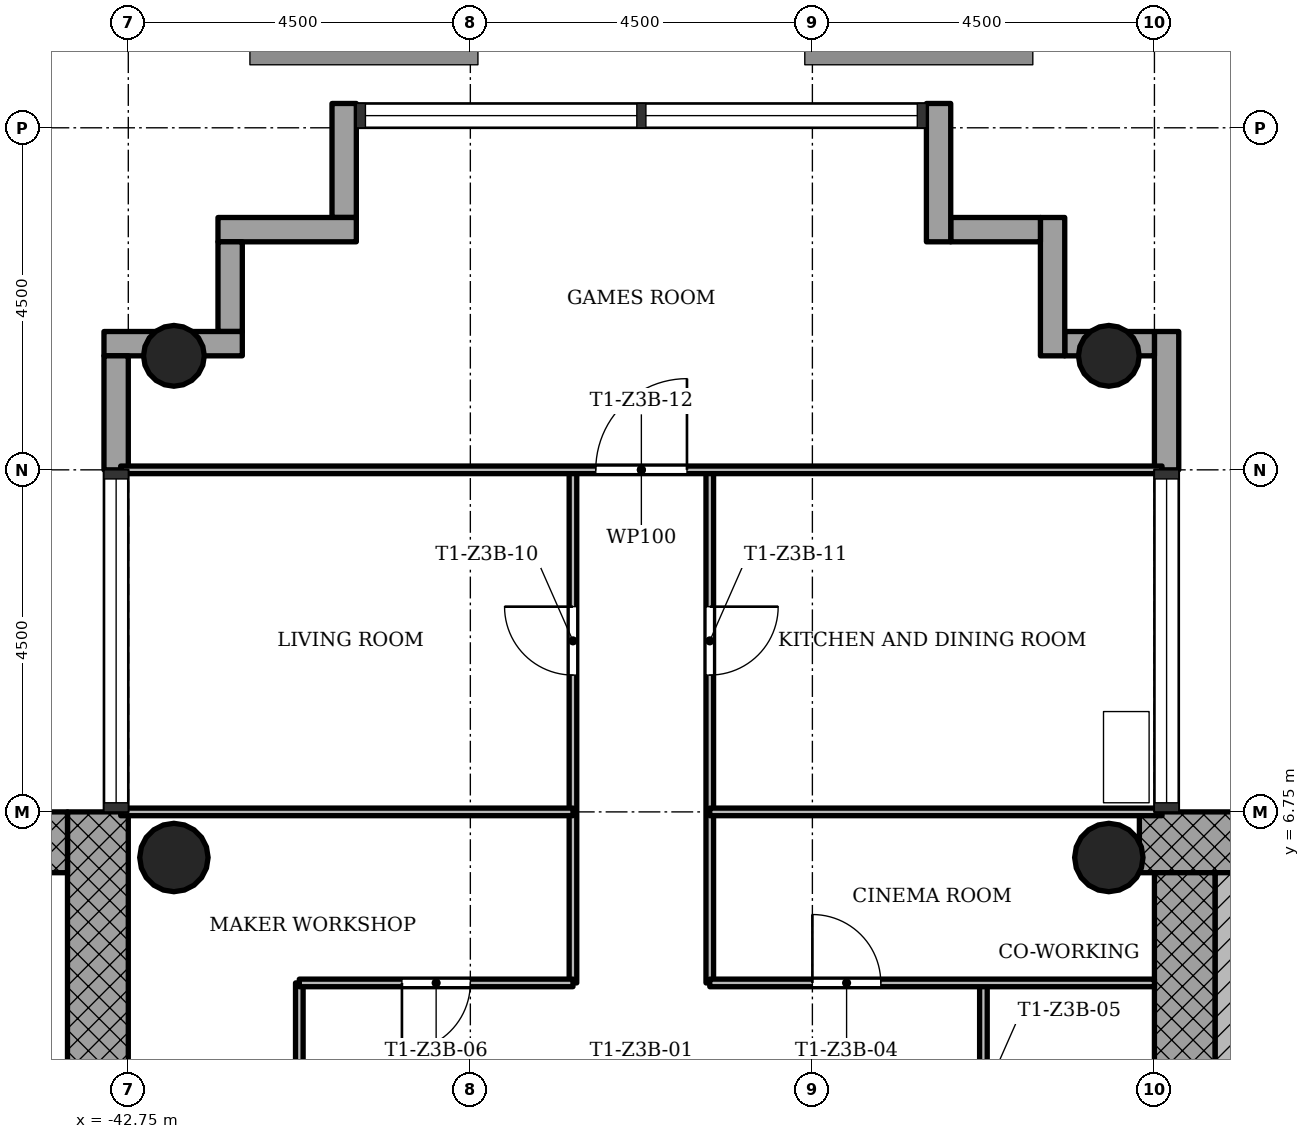
"""IFC4 building model, lengths in metres.
Left out: names, types, materials, properties, quantities, classifications, styles, units other than length and angle.
Written with IfcOpenShell. Run it as: python <this file> out.ifc"""

import sys

from ifc_helpers import new_model, si_unit, direction, frame, frame_2d, origin, origin_2d, place, context, subcontext, project, spatial, rectangle, hollow_circle, extrude, element, fill, save


model = new_model("IFC4")
c1 = context("Model", 3, precision=1e-05, world=origin(), true_north=direction((0.0, 1.0)))
c2 = subcontext(c1, "Body", "Model", "MODEL_VIEW")
j1 = project(units=[si_unit("LENGTHUNIT", "METRE"), si_unit("PLANEANGLEUNIT", "RADIAN")], contexts=[c1])
p1 = place(None, origin())
s1 = spatial("IfcSite", under=j1, at=p1, CompositionType="ELEMENT")
p2 = place(p1, origin())
s2 = spatial("IfcBuilding", under=s1, at=p2, CompositionType="ELEMENT")
p3 = place(p2, frame((0.0, 0.0, 143.9)))
s3 = spatial("IfcBuildingStorey", under=s2, at=p3, CompositionType="ELEMENT", Elevation=143.9)
p4 = place(p3, frame((-20.652, 6.35, 0.0), z_axis=(0.0, 0.0, 1.0), x_axis=(-1.0, 0.0, 0.0)))
e1 = element("IfcWall", 1, at=p4, inside=s3, PredefinedType="SHEAR", context=c2, shape_type="SweptSolid", body=[
    extrude(rectangle(XDim=8.796, YDim=0.8, at=frame_2d((4.398, 0.0))), origin(), (0.0, 0.0, 1.0), 3.4),
])
p5 = place(p3, frame((-28.85, 5.95, 0.0), z_axis=(0.0, 0.0, 1.0), x_axis=(0.0, -1.0, 0.0)))
e2 = element("IfcWall", 2, at=p5, inside=s3, PredefinedType="SHEAR", context=c2, shape_type="SweptSolid", body=[
    extrude(rectangle(XDim=12.7, YDim=0.8, at=frame_2d((6.35, 0.0))), origin(), (0.0, 0.0, 1.0), 3.4),
])
p6 = place(p5, frame((5.05, 0.0, 0.0)))
e3 = element("IfcOpeningElement", 3, at=p6, cuts=e2, PredefinedType="OPENING", context=c2, shape_type="SweptSolid", body=[
    extrude(rectangle(XDim=1.8, YDim=2.1, at=frame_2d((0.9, 1.05))), frame((0.0, 0.41, 0.0), z_axis=(0.0, -1.0, 0.0), x_axis=(1.0, 0.0, 0.0)), (0.0, 0.0, 1.0), 0.82),
])
p7 = place(p3, frame((-43.15, -5.95, 0.0), z_axis=(0.0, 0.0, 1.0), x_axis=(0.0, 1.0, 0.0)))
e4 = element("IfcWall", 4, at=p7, inside=s3, PredefinedType="SHEAR", context=c2, shape_type="SweptSolid", body=[
    extrude(rectangle(XDim=12.7, YDim=0.8, at=frame_2d((6.35, 0.0))), origin(), (0.0, 0.0, 1.0), 3.4),
])
p8 = place(p7, frame((5.05, 0.0, 0.0)))
e5 = element("IfcOpeningElement", 5, at=p8, cuts=e4, PredefinedType="OPENING", context=c2, shape_type="SweptSolid", body=[
    extrude(rectangle(XDim=1.8, YDim=2.1, at=frame_2d((0.9, 1.05))), frame((0.0, 0.41, 0.0), z_axis=(0.0, -1.0, 0.0), x_axis=(1.0, 0.0, 0.0)), (0.0, 0.0, 1.0), 0.82),
])
p9 = place(p3, frame((-43.55, 6.35, 0.0), z_axis=(0.0, 0.0, 1.0), x_axis=(-1.0, 0.0, 0.0)))
e6 = element("IfcWall", 6, at=p9, inside=s3, PredefinedType="SHEAR", context=c2, shape_type="SweptSolid", body=[
    extrude(rectangle(XDim=8.2, YDim=0.8, at=frame_2d((4.1, 0.0))), origin(), (0.0, 0.0, 1.0), 3.4),
])
for number, where, z_axis, x_axis in (
    (7, (-29.85, 12.75, 0.0), (0.0, 0.0, 1.0), (1.0, 0.0, 0.0)),
    (8, (-42.15, 12.75, 0.0), (0.0, 0.0, 1.0), (1.0, 0.0, 0.0)),
):
    element("IfcColumn", number, at=place(p3, frame(where, z_axis=z_axis, x_axis=x_axis)), inside=s3, PredefinedType="COLUMN", context=c2, shape_type="SweptSolid", body=[
        extrude(hollow_circle(Radius=0.4, WallThickness=0.028, at=origin_2d()), origin(), (0.0, 0.0, 1.0), 3.4),
    ])
for number, where, z_axis, x_axis in (
    (9, (-29.85, 6.15, 0.0), (0.0, 0.0, 1.0), (1.0, 0.0, 0.0)),
    (10, (-42.15, 6.15, 0.0), (0.0, 0.0, 1.0), (1.0, 0.0, 0.0)),
):
    element("IfcColumn", number, at=place(p3, frame(where, z_axis=z_axis, x_axis=x_axis)), inside=s3, PredefinedType="COLUMN", context=c2, shape_type="SweptSolid", body=[
        extrude(hollow_circle(Radius=0.45, WallThickness=0.032, at=origin_2d()), origin(), (0.0, 0.0, 1.0), 3.4),
    ])
p10 = place(p3, frame((-29.09, 11.25, -0.3), z_axis=(0.0, 0.0, 1.0), x_axis=(0.0, 1.0, 0.0)))
e11 = element("IfcWall", 11, at=p10, inside=s3, PredefinedType="STANDARD", context=c2, shape_type="SweptSolid", body=[
    extrude(rectangle(XDim=1.82, YDim=0.32, at=frame_2d((0.91, 0.0))), origin(), (0.0, 0.0, 1.0), 3.4),
])
p11 = place(p3, frame((-29.25, 12.91, -0.3), z_axis=(0.0, 0.0, 1.0), x_axis=(-1.0, 0.0, 0.0)))
e12 = element("IfcWall", 12, at=p11, inside=s3, PredefinedType="STANDARD", context=c2, shape_type="SweptSolid", body=[
    extrude(rectangle(XDim=1.18, YDim=0.32, at=frame_2d((0.59, 0.0))), origin(), (0.0, 0.0, 1.0), 3.4),
])
p12 = place(p3, frame((-30.59, 12.75, -0.3), z_axis=(0.0, 0.0, 1.0), x_axis=(0.0, 1.0, 0.0)))
e13 = element("IfcWall", 13, at=p12, inside=s3, PredefinedType="STANDARD", context=c2, shape_type="SweptSolid", body=[
    extrude(rectangle(XDim=1.82, YDim=0.32, at=frame_2d((0.91, 0.0))), origin(), (0.0, 0.0, 1.0), 3.4),
])
p13 = place(p3, frame((-30.75, 14.41, -0.3), z_axis=(0.0, 0.0, 1.0), x_axis=(-1.0, 0.0, 0.0)))
e14 = element("IfcWall", 14, at=p13, inside=s3, PredefinedType="STANDARD", context=c2, shape_type="SweptSolid", body=[
    extrude(rectangle(XDim=1.18, YDim=0.32, at=frame_2d((0.59, 0.0))), origin(), (0.0, 0.0, 1.0), 3.4),
])
p14 = place(p3, frame((-32.09, 14.25, -0.3), z_axis=(0.0, 0.0, 1.0), x_axis=(0.0, 1.0, 0.0)))
e15 = element("IfcWall", 15, at=p14, inside=s3, PredefinedType="STANDARD", context=c2, shape_type="SweptSolid", body=[
    extrude(rectangle(XDim=1.82, YDim=0.32, at=frame_2d((0.91, 0.0))), origin(), (0.0, 0.0, 1.0), 3.4),
])
p15 = place(p3, frame((-39.91, 16.07, -0.3), z_axis=(0.0, 0.0, 1.0), x_axis=(0.0, -1.0, 0.0)))
e16 = element("IfcWall", 16, at=p15, inside=s3, PredefinedType="STANDARD", context=c2, shape_type="SweptSolid", body=[
    extrude(rectangle(XDim=1.5, YDim=0.32, at=frame_2d((0.75, 0.0))), origin(), (0.0, 0.0, 1.0), 3.4),
])
p16 = place(p3, frame((-39.75, 14.41, -0.3), z_axis=(0.0, 0.0, 1.0), x_axis=(-1.0, 0.0, 0.0)))
e17 = element("IfcWall", 17, at=p16, inside=s3, PredefinedType="STANDARD", context=c2, shape_type="SweptSolid", body=[
    extrude(rectangle(XDim=1.82, YDim=0.32, at=frame_2d((0.91, 0.0))), origin(), (0.0, 0.0, 1.0), 3.4),
])
p17 = place(p3, frame((-41.41, 14.25, -0.3), z_axis=(0.0, 0.0, 1.0), x_axis=(0.0, -1.0, 0.0)))
e18 = element("IfcWall", 18, at=p17, inside=s3, PredefinedType="STANDARD", context=c2, shape_type="SweptSolid", body=[
    extrude(rectangle(XDim=1.18, YDim=0.32, at=frame_2d((0.59, 0.0))), origin(), (0.0, 0.0, 1.0), 3.4),
])
p18 = place(p3, frame((-41.25, 12.91, -0.3), z_axis=(0.0, 0.0, 1.0), x_axis=(-1.0, 0.0, 0.0)))
e19 = element("IfcWall", 19, at=p18, inside=s3, PredefinedType="STANDARD", context=c2, shape_type="SweptSolid", body=[
    extrude(rectangle(XDim=1.82, YDim=0.32, at=frame_2d((0.91, 0.0))), origin(), (0.0, 0.0, 1.0), 3.4),
])
p19 = place(p3, frame((-42.91, 12.75, -0.3), z_axis=(0.0, 0.0, 1.0), x_axis=(0.0, -1.0, 0.0)))
e20 = element("IfcWall", 20, at=p19, inside=s3, PredefinedType="STANDARD", context=c2, shape_type="SweptSolid", body=[
    extrude(rectangle(XDim=1.5, YDim=0.32, at=frame_2d((0.75, 0.0))), origin(), (0.0, 0.0, 1.0), 3.4),
])
p20 = place(p3, frame((-40.5, 1.5, 0.0), z_axis=(0.0, 0.0, 1.0), x_axis=(0.0, 1.0, 0.0)))
e21 = element("IfcWall", 21, at=p20, inside=s3, PredefinedType="PARTITIONING", context=c2, shape_type="SweptSolid", body=[
    extrude(rectangle(XDim=3.0, YDim=0.1, at=frame_2d((1.5, 0.0))), origin(), (0.0, 0.0, 1.0), 3.0),
])
p21 = place(p3, frame((-36.9, 4.5, 0.0), z_axis=(0.0, 0.0, 1.0), x_axis=(0.0, 1.0, 0.0)))
e22 = element("IfcWall", 22, at=p21, inside=s3, PredefinedType="PARTITIONING", context=c2, shape_type="SweptSolid", body=[
    extrude(rectangle(XDim=6.75, YDim=0.1, at=frame_2d((3.375, 0.0))), origin(), (0.0, 0.0, 1.0), 3.0),
])
p22 = place(p21, frame((4.05, 0.0, 0.0)))
e23 = element("IfcOpeningElement", 23, at=p22, cuts=e22, PredefinedType="OPENING", context=c2, shape_type="SweptSolid", body=[
    extrude(rectangle(XDim=0.9, YDim=2.1, at=frame_2d((0.45, 1.05))), frame((0.0, 0.06, 0.0), z_axis=(0.0, -1.0, 0.0), x_axis=(1.0, 0.0, 0.0)), (0.0, 0.0, 1.0), 0.12),
])
p23 = place(p3, frame((-35.1, 4.5, 0.0), z_axis=(0.0, 0.0, 1.0), x_axis=(0.0, 1.0, 0.0)))
e24 = element("IfcWall", 24, at=p23, inside=s3, PredefinedType="PARTITIONING", context=c2, shape_type="SweptSolid", body=[
    extrude(rectangle(XDim=6.75, YDim=0.1, at=frame_2d((3.375, 0.0))), origin(), (0.0, 0.0, 1.0), 3.0),
])
p24 = place(p23, frame((4.05, 0.0, 0.0)))
e25 = element("IfcOpeningElement", 25, at=p24, cuts=e24, PredefinedType="OPENING", context=c2, shape_type="SweptSolid", body=[
    extrude(rectangle(XDim=0.9, YDim=2.1, at=frame_2d((0.45, 1.05))), frame((0.0, 0.06, 0.0), z_axis=(0.0, -1.0, 0.0), x_axis=(1.0, 0.0, 0.0)), (0.0, 0.0, 1.0), 0.12),
])
p25 = place(p3, frame((-31.5, 1.5, 0.0), z_axis=(0.0, 0.0, 1.0), x_axis=(0.0, 1.0, 0.0)))
e26 = element("IfcWall", 26, at=p25, inside=s3, PredefinedType="PARTITIONING", context=c2, shape_type="SweptSolid", body=[
    extrude(rectangle(XDim=3.0, YDim=0.1, at=frame_2d((1.5, 0.0))), origin(), (0.0, 0.0, 1.0), 3.0),
])
p26 = place(p25, frame((1.05, 0.0, 0.0)))
e27 = element("IfcOpeningElement", 27, at=p26, cuts=e26, PredefinedType="OPENING", context=c2, shape_type="SweptSolid", body=[
    extrude(rectangle(XDim=0.9, YDim=2.1, at=frame_2d((0.45, 1.05))), frame((0.0, 0.06, 0.0), z_axis=(0.0, -1.0, 0.0), x_axis=(1.0, 0.0, 0.0)), (0.0, 0.0, 1.0), 0.12),
])
p27 = place(p3, frame((-40.5, 4.5, 0.0), z_axis=(0.0, 0.0, 1.0), x_axis=(1.0, 0.0, 0.0)))
e28 = element("IfcWall", 28, at=p27, inside=s3, PredefinedType="PARTITIONING", context=c2, shape_type="SweptSolid", body=[
    extrude(rectangle(XDim=3.6, YDim=0.1, at=frame_2d((1.8, 0.0))), origin(), (0.0, 0.0, 1.0), 3.0),
])
p28 = place(p27, frame((1.35, 0.0, 0.0)))
e29 = element("IfcOpeningElement", 29, at=p28, cuts=e28, PredefinedType="OPENING", context=c2, shape_type="SweptSolid", body=[
    extrude(rectangle(XDim=0.9, YDim=2.1, at=frame_2d((0.45, 1.05))), frame((0.0, 0.06, 0.0), z_axis=(0.0, -1.0, 0.0), x_axis=(1.0, 0.0, 0.0)), (0.0, 0.0, 1.0), 0.12),
])
p29 = place(p3, frame((-35.1, 4.5, 0.0), z_axis=(0.0, 0.0, 1.0), x_axis=(1.0, 0.0, 0.0)))
e30 = element("IfcWall", 30, at=p29, inside=s3, PredefinedType="PARTITIONING", context=c2, shape_type="SweptSolid", body=[
    extrude(rectangle(XDim=5.85, YDim=0.1, at=frame_2d((2.925, 0.0))), origin(), (0.0, 0.0, 1.0), 3.0),
])
p30 = place(p29, frame((1.35, 0.0, 0.0)))
e31 = element("IfcOpeningElement", 31, at=p30, cuts=e30, PredefinedType="OPENING", context=c2, shape_type="SweptSolid", body=[
    extrude(rectangle(XDim=0.9, YDim=2.1, at=frame_2d((0.45, 1.05))), frame((0.0, 0.06, 0.0), z_axis=(0.0, -1.0, 0.0), x_axis=(1.0, 0.0, 0.0)), (0.0, 0.0, 1.0), 0.12),
])
for number, where, z_axis, x_axis in (
    (32, (-42.85, 6.75, 0.0), (0.0, 0.0, 1.0), (1.0, 0.0, 0.0)),
    (33, (-35.1, 6.75, 0.0), (0.0, 0.0, 1.0), (1.0, 0.0, 0.0)),
):
    element("IfcWall", number, at=place(p3, frame(where, z_axis=z_axis, x_axis=x_axis)), inside=s3, PredefinedType="PARTITIONING", context=c2, shape_type="SweptSolid", body=[
        extrude(rectangle(XDim=5.95, YDim=0.1, at=frame_2d((2.975, 0.0))), origin(), (0.0, 0.0, 1.0), 3.0),
    ])
p31 = place(p3, frame((-42.85, 11.25, 0.0), z_axis=(0.0, 0.0, 1.0), x_axis=(1.0, 0.0, 0.0)))
e34 = element("IfcWall", 34, at=p31, inside=s3, PredefinedType="PARTITIONING", context=c2, shape_type="SweptSolid", body=[
    extrude(rectangle(XDim=13.7, YDim=0.1, at=frame_2d((6.85, 0.0))), origin(), (0.0, 0.0, 1.0), 3.0),
])
p32 = place(p31, frame((6.25, 0.0, 0.0)))
e35 = element("IfcOpeningElement", 35, at=p32, cuts=e34, PredefinedType="OPENING", context=c2, shape_type="SweptSolid", body=[
    extrude(rectangle(XDim=1.2, YDim=2.1, at=frame_2d((0.6, 1.05))), frame((0.0, 0.06, 0.0), z_axis=(0.0, -1.0, 0.0), x_axis=(1.0, 0.0, 0.0)), (0.0, 0.0, 1.0), 0.12),
])
p33 = place(p3, frame((-28.25, 1.85, 0.0), z_axis=(0.0, 0.0, 1.0), x_axis=(0.0, 1.0, 0.0)))
e36 = element("IfcWall", 36, at=p33, inside=s3, PredefinedType="SHEAR", context=c2, shape_type="SweptSolid", body=[
    extrude(rectangle(XDim=4.1, YDim=0.4, at=frame_2d((2.05, 0.0))), origin(), (0.0, 0.0, 1.0), 3.4),
])
p34 = place(p30, origin())
e37 = element("IfcDoor", 37, at=p34, inside=s3, OperationType="SINGLE_SWING_RIGHT", PredefinedType="DOOR", context=c2, shape_type="SweptSolid", body=[
    extrude(rectangle(XDim=0.9, YDim=2.1, at=frame_2d((0.45, 1.05))), frame((0.0, 0.025, 0.0), z_axis=(0.0, -1.0, 0.0), x_axis=(1.0, 0.0, 0.0)), (0.0, 0.0, 1.0), 0.05),
])
fill(e31, e37)
p35 = place(p28, origin())
e38 = element("IfcDoor", 38, at=p35, inside=s3, OperationType="SINGLE_SWING_LEFT", PredefinedType="DOOR", context=c2, shape_type="SweptSolid", body=[
    extrude(rectangle(XDim=0.9, YDim=2.1, at=frame_2d((0.45, 1.05))), frame((0.0, 0.025, 0.0), z_axis=(0.0, -1.0, 0.0), x_axis=(1.0, 0.0, 0.0)), (0.0, 0.0, 1.0), 0.05),
])
fill(e29, e38)
p36 = place(p22, origin())
e39 = element("IfcDoor", 39, at=p36, inside=s3, OperationType="SINGLE_SWING_LEFT", PredefinedType="DOOR", context=c2, shape_type="SweptSolid", body=[
    extrude(rectangle(XDim=0.9, YDim=2.1, at=frame_2d((0.45, 1.05))), frame((0.0, 0.025, 0.0), z_axis=(0.0, -1.0, 0.0), x_axis=(1.0, 0.0, 0.0)), (0.0, 0.0, 1.0), 0.05),
])
fill(e23, e39)
p37 = place(p24, origin())
e40 = element("IfcDoor", 40, at=p37, inside=s3, OperationType="SINGLE_SWING_RIGHT", PredefinedType="DOOR", context=c2, shape_type="SweptSolid", body=[
    extrude(rectangle(XDim=0.9, YDim=2.1, at=frame_2d((0.45, 1.05))), frame((0.0, 0.025, 0.0), z_axis=(0.0, -1.0, 0.0), x_axis=(1.0, 0.0, 0.0)), (0.0, 0.0, 1.0), 0.05),
])
fill(e25, e40)
p38 = place(p32, origin())
e41 = element("IfcDoor", 41, at=p38, inside=s3, OperationType="SINGLE_SWING_LEFT", PredefinedType="DOOR", context=c2, shape_type="SweptSolid", body=[
    extrude(rectangle(XDim=1.2, YDim=2.1, at=frame_2d((0.6, 1.05))), frame((0.0, 0.025, 0.0), z_axis=(0.0, -1.0, 0.0), x_axis=(1.0, 0.0, 0.0)), (0.0, 0.0, 1.0), 0.05),
])
fill(e35, e41)
save(model, sys.argv[1])
